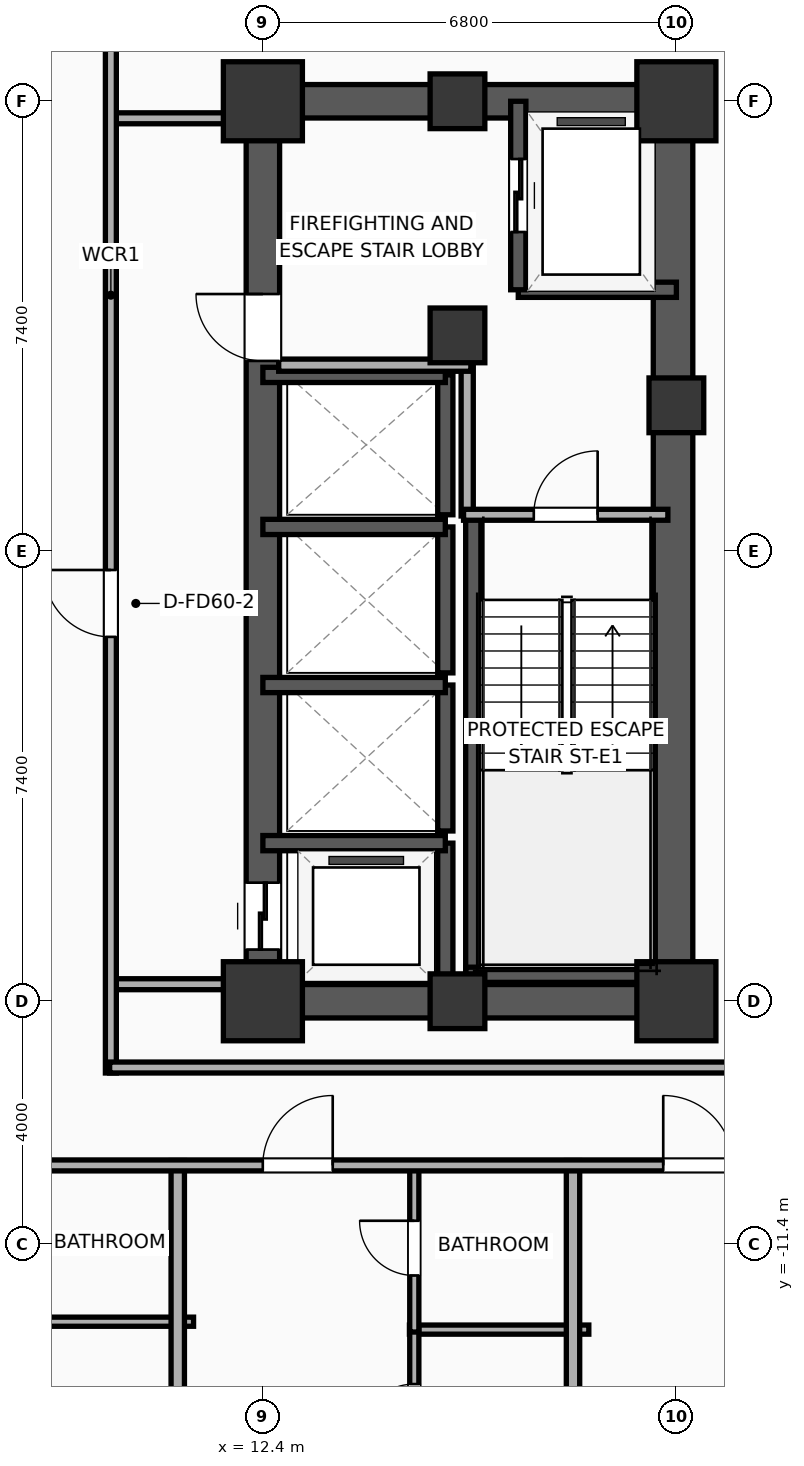
"""IFC4 building model, lengths in metres.
Left out: names, types, materials, properties, quantities, classifications, styles, units other than length and angle.
Written with IfcOpenShell. Run it as: python <this file> out.ifc"""

import sys

from ifc_helpers import new_model, si_unit, direction, frame, frame_2d, origin, origin_2d, place, context, subcontext, project, spatial, rectangle, extrude, element, fill, save


model = new_model("IFC4")
c1 = context("Model", 3, precision=1e-05, world=origin(), true_north=direction((0.0, 1.0)))
c2 = subcontext(c1, "Body", "Model", "MODEL_VIEW")
j1 = project(units=[si_unit("LENGTHUNIT", "METRE"), si_unit("PLANEANGLEUNIT", "RADIAN")], contexts=[c1])
p1 = place(None, origin())
s1 = spatial("IfcSite", under=j1, at=p1, CompositionType="ELEMENT")
p2 = place(p1, origin())
s2 = spatial("IfcBuilding", under=s1, at=p2, CompositionType="ELEMENT")
p3 = place(p2, frame((0.0, 0.0, 128.7)))
s3 = spatial("IfcBuildingStorey", under=s2, at=p3, CompositionType="ELEMENT", Elevation=128.7)
p4 = place(p3, frame((12.4, -7.4, 0.0), z_axis=(0.0, 0.0, 1.0), x_axis=(1.0, 0.0, 0.0)))
e1 = element("IfcColumn", 1, at=p4, inside=s3, PredefinedType="COLUMN", context=c2, shape_type="SweptSolid", body=[
    extrude(rectangle(XDim=1.3, YDim=1.3, at=origin_2d()), origin(), (0.0, 0.0, 1.0), 3.9),
])
p5 = place(p3, frame((15.6, 3.55, 0.0), z_axis=(0.0, 0.0, 1.0), x_axis=(1.0, 0.0, 0.0)))
e2 = element("IfcColumn", 2, at=p5, inside=s3, PredefinedType="COLUMN", context=c2, shape_type="SweptSolid", body=[
    extrude(rectangle(XDim=0.9, YDim=0.9, at=origin_2d()), origin(), (0.0, 0.0, 1.0), 3.9),
])
p6 = place(p3, frame((12.4, 7.4, 0.0), z_axis=(0.0, 0.0, 1.0), x_axis=(1.0, 0.0, 0.0)))
e3 = element("IfcColumn", 3, at=p6, inside=s3, PredefinedType="COLUMN", context=c2, shape_type="SweptSolid", body=[
    extrude(rectangle(XDim=1.3, YDim=1.3, at=origin_2d()), origin(), (0.0, 0.0, 1.0), 3.9),
])
for number, where, z_axis, x_axis in (
    (4, (15.6, -7.4, 0.0), (0.0, 0.0, 1.0), (1.0, 0.0, 0.0)),
    (5, (15.6, 7.4, 0.0), (0.0, 0.0, 1.0), (1.0, 0.0, 0.0)),
):
    element("IfcColumn", number, at=place(p3, frame(where, z_axis=z_axis, x_axis=x_axis)), inside=s3, PredefinedType="COLUMN", context=c2, shape_type="SweptSolid", body=[
        extrude(rectangle(XDim=0.9, YDim=0.9, at=origin_2d()), origin(), (0.0, 0.0, 1.0), 3.9),
    ])
p7 = place(p3, frame((19.2, -7.4, 0.0), z_axis=(0.0, 0.0, 1.0), x_axis=(1.0, 0.0, 0.0)))
e6 = element("IfcColumn", 6, at=p7, inside=s3, PredefinedType="COLUMN", context=c2, shape_type="SweptSolid", body=[
    extrude(rectangle(XDim=1.3, YDim=1.3, at=origin_2d()), origin(), (0.0, 0.0, 1.0), 3.9),
])
p8 = place(p3, frame((19.2, 2.4, 0.0), z_axis=(0.0, 0.0, 1.0), x_axis=(1.0, 0.0, 0.0)))
e7 = element("IfcColumn", 7, at=p8, inside=s3, PredefinedType="COLUMN", context=c2, shape_type="SweptSolid", body=[
    extrude(rectangle(XDim=0.9, YDim=0.9, at=origin_2d()), origin(), (0.0, 0.0, 1.0), 3.9),
])
p9 = place(p3, frame((19.2, 7.4, 0.0), z_axis=(0.0, 0.0, 1.0), x_axis=(1.0, 0.0, 0.0)))
e8 = element("IfcColumn", 8, at=p9, inside=s3, PredefinedType="COLUMN", context=c2, shape_type="SweptSolid", body=[
    extrude(rectangle(XDim=1.3, YDim=1.3, at=origin_2d()), origin(), (0.0, 0.0, 1.0), 3.9),
])
for number, where, z_axis, x_axis in (
    (9, (12.125, -7.4, 0.0), (0.0, 0.0, 1.0), (1.0, 0.0, 0.0)),
    (10, (12.125, 7.4, 0.0), (0.0, 0.0, 1.0), (1.0, 0.0, 0.0)),
):
    element("IfcWall", number, at=place(p3, frame(where, z_axis=z_axis, x_axis=x_axis)), inside=s3, PredefinedType="SHEAR", context=c2, shape_type="SweptSolid", body=[
        extrude(rectangle(XDim=7.35, YDim=0.55, at=frame_2d((3.675, 0.0))), origin(), (0.0, 0.0, 1.0), 3.65),
    ])
p10 = place(p3, frame((12.4, -7.4, 0.0), z_axis=(0.0, 0.0, 1.0), x_axis=(0.0, 1.0, 0.0)))
e11 = element("IfcWall", 11, at=p10, inside=s3, PredefinedType="SHEAR", context=c2, shape_type="SweptSolid", body=[
    extrude(rectangle(XDim=14.8, YDim=0.55, at=frame_2d((7.4, 0.0))), origin(), (0.0, 0.0, 1.0), 3.65),
])
p11 = place(p10, frame((0.85, 0.0, 0.0)))
e12 = element("IfcOpeningElement", 12, at=p11, cuts=e11, PredefinedType="OPENING", context=c2, shape_type="SweptSolid", body=[
    extrude(rectangle(XDim=1.1, YDim=2.05, at=frame_2d((0.55, 1.025))), frame((0.0, 0.285, 0.0), z_axis=(0.0, -1.0, 0.0), x_axis=(1.0, 0.0, 0.0)), (0.0, 0.0, 1.0), 0.57),
])
p12 = place(p10, frame((10.53, 0.0, 0.0)))
e13 = element("IfcOpeningElement", 13, at=p12, cuts=e11, PredefinedType="OPENING", context=c2, shape_type="SweptSolid", body=[
    extrude(rectangle(XDim=1.1, YDim=2.05, at=frame_2d((0.55, 1.025))), frame((0.0, 0.285, 0.0), z_axis=(0.0, -1.0, 0.0), x_axis=(1.0, 0.0, 0.0)), (0.0, 0.0, 1.0), 0.57),
])
p13 = place(p3, frame((19.145, -7.4, 0.0), z_axis=(0.0, 0.0, 1.0), x_axis=(0.0, 1.0, 0.0)))
e14 = element("IfcWall", 14, at=p13, inside=s3, PredefinedType="SHEAR", context=c2, shape_type="SweptSolid", body=[
    extrude(rectangle(XDim=14.8, YDim=0.65, at=frame_2d((7.4, 0.0))), origin(), (0.0, 0.0, 1.0), 3.65),
])
p14 = place(p3, frame((15.86, -7.085, 0.0), z_axis=(0.0, 0.0, 1.0), x_axis=(0.0, 1.0, 0.0)))
e15 = element("IfcWall", 15, at=p14, inside=s3, PredefinedType="SOLIDWALL", context=c2, shape_type="SweptSolid", body=[
    extrude(rectangle(XDim=7.685, YDim=0.25, at=frame_2d((3.843, 0.0))), origin(), (0.0, 0.0, 1.0), 3.65),
])
p15 = place(p3, frame((15.74, -6.965, 0.0), z_axis=(0.0, 0.0, 1.0), x_axis=(1.0, 0.0, 0.0)))
e16 = element("IfcWall", 16, at=p15, inside=s3, PredefinedType="SOLIDWALL", context=c2, shape_type="SweptSolid", body=[
    extrude(rectangle(XDim=3.46, YDim=0.25, at=frame_2d((1.73, 0.0))), origin(), (0.0, 0.0, 1.0), 3.65),
])
p16 = place(p3, frame((16.6, 4.3, 0.0), z_axis=(0.0, 0.0, 1.0), x_axis=(1.0, 0.0, 0.0)))
e17 = element("IfcWall", 17, at=p16, inside=s3, PredefinedType="SOLIDWALL", context=c2, shape_type="SweptSolid", body=[
    extrude(rectangle(XDim=2.6, YDim=0.25, at=frame_2d((1.3, 0.0))), origin(), (0.0, 0.0, 1.0), 3.65),
])
p17 = place(p3, frame((16.6, 7.4, 0.0), z_axis=(0.0, 0.0, 1.0), x_axis=(0.0, -1.0, 0.0)))
e18 = element("IfcWall", 18, at=p17, inside=s3, PredefinedType="SOLIDWALL", context=c2, shape_type="SweptSolid", body=[
    extrude(rectangle(XDim=3.1, YDim=0.25, at=frame_2d((1.55, 0.0))), origin(), (0.0, 0.0, 1.0), 3.65),
])
p18 = place(p17, frame((0.95, 0.0, 0.0)))
e19 = element("IfcOpeningElement", 19, at=p18, cuts=e18, PredefinedType="OPENING", context=c2, shape_type="SweptSolid", body=[
    extrude(rectangle(XDim=1.2, YDim=2.05, at=frame_2d((0.6, 1.025))), frame((0.0, 0.135, 0.0), z_axis=(0.0, -1.0, 0.0), x_axis=(1.0, 0.0, 0.0)), (0.0, 0.0, 1.0), 0.27),
])
p19 = place(p3, frame((15.4, -7.4, 0.0), z_axis=(0.0, 0.0, 1.0), x_axis=(0.0, 1.0, 0.0)))
e20 = element("IfcWall", 20, at=p19, inside=s3, PredefinedType="SOLIDWALL", context=c2, shape_type="SweptSolid", body=[
    extrude(rectangle(XDim=2.6, YDim=0.25, at=frame_2d((1.3, 0.0))), origin(), (0.0, 0.0, 1.0), 3.65),
])
p20 = place(p3, frame((15.4, -4.8, 0.0), z_axis=(0.0, 0.0, 1.0), x_axis=(-1.0, 0.0, 0.0)))
e21 = element("IfcWall", 21, at=p20, inside=s3, PredefinedType="SOLIDWALL", context=c2, shape_type="SweptSolid", body=[
    extrude(rectangle(XDim=3.0, YDim=0.25, at=frame_2d((1.5, 0.0))), origin(), (0.0, 0.0, 1.0), 3.65),
])
p21 = place(p3, frame((15.4, -4.6, 0.0), z_axis=(0.0, 0.0, 1.0), x_axis=(0.0, 1.0, 0.0)))
e22 = element("IfcWall", 22, at=p21, inside=s3, PredefinedType="SOLIDWALL", context=c2, shape_type="SweptSolid", body=[
    extrude(rectangle(XDim=2.4, YDim=0.25, at=frame_2d((1.2, 0.0))), origin(), (0.0, 0.0, 1.0), 3.65),
])
p22 = place(p3, frame((15.4, -2.2, 0.0), z_axis=(0.0, 0.0, 1.0), x_axis=(-1.0, 0.0, 0.0)))
e23 = element("IfcWall", 23, at=p22, inside=s3, PredefinedType="SOLIDWALL", context=c2, shape_type="SweptSolid", body=[
    extrude(rectangle(XDim=3.0, YDim=0.25, at=frame_2d((1.5, 0.0))), origin(), (0.0, 0.0, 1.0), 3.65),
])
p23 = place(p3, frame((15.4, -2.0, 0.0), z_axis=(0.0, 0.0, 1.0), x_axis=(0.0, 1.0, 0.0)))
e24 = element("IfcWall", 24, at=p23, inside=s3, PredefinedType="SOLIDWALL", context=c2, shape_type="SweptSolid", body=[
    extrude(rectangle(XDim=2.4, YDim=0.25, at=frame_2d((1.2, 0.0))), origin(), (0.0, 0.0, 1.0), 3.65),
])
p24 = place(p3, frame((15.4, 0.4, 0.0), z_axis=(0.0, 0.0, 1.0), x_axis=(-1.0, 0.0, 0.0)))
e25 = element("IfcWall", 25, at=p24, inside=s3, PredefinedType="SOLIDWALL", context=c2, shape_type="SweptSolid", body=[
    extrude(rectangle(XDim=3.0, YDim=0.25, at=frame_2d((1.5, 0.0))), origin(), (0.0, 0.0, 1.0), 3.65),
])
p25 = place(p3, frame((15.4, 0.6, 0.0), z_axis=(0.0, 0.0, 1.0), x_axis=(0.0, 1.0, 0.0)))
e26 = element("IfcWall", 26, at=p25, inside=s3, PredefinedType="SOLIDWALL", context=c2, shape_type="SweptSolid", body=[
    extrude(rectangle(XDim=2.3, YDim=0.25, at=frame_2d((1.15, 0.0))), origin(), (0.0, 0.0, 1.0), 3.65),
])
p26 = place(p3, frame((15.4, 2.9, 0.0), z_axis=(0.0, 0.0, 1.0), x_axis=(-1.0, 0.0, 0.0)))
e27 = element("IfcWall", 27, at=p26, inside=s3, PredefinedType="SOLIDWALL", context=c2, shape_type="SweptSolid", body=[
    extrude(rectangle(XDim=3.0, YDim=0.25, at=frame_2d((1.5, 0.0))), origin(), (0.0, 0.0, 1.0), 3.65),
])
p27 = place(p3, frame((15.76, 0.58, 0.0), z_axis=(0.0, 0.0, 1.0), x_axis=(0.0, 1.0, 0.0)))
e28 = element("IfcWall", 28, at=p27, inside=s3, PredefinedType="PARTITIONING", context=c2, shape_type="SweptSolid", body=[
    extrude(rectangle(XDim=2.52, YDim=0.2, at=frame_2d((1.26, 0.0))), origin(), (0.0, 0.0, 1.0), 3.65),
])
p28 = place(p3, frame((12.66, 3.06, 0.0), z_axis=(0.0, 0.0, 1.0), x_axis=(1.0, 0.0, 0.0)))
e29 = element("IfcWall", 29, at=p28, inside=s3, PredefinedType="PARTITIONING", context=c2, shape_type="SweptSolid", body=[
    extrude(rectangle(XDim=3.16, YDim=0.2, at=frame_2d((1.58, 0.0))), origin(), (0.0, 0.0, 1.0), 3.65),
])
p29 = place(p3, frame((15.7, 0.6, 0.0), z_axis=(0.0, 0.0, 1.0), x_axis=(1.0, 0.0, 0.0)))
e30 = element("IfcWall", 30, at=p29, inside=s3, PredefinedType="PARTITIONING", context=c2, shape_type="SweptSolid", body=[
    extrude(rectangle(XDim=3.36, YDim=0.18, at=frame_2d((1.68, 0.0))), origin(), (0.0, 0.0, 1.0), 3.65),
])
p30 = place(p29, frame((1.155, 0.0, 0.0)))
e31 = element("IfcOpeningElement", 31, at=p30, cuts=e30, PredefinedType="OPENING", context=c2, shape_type="SweptSolid", body=[
    extrude(rectangle(XDim=1.05, YDim=2.05, at=frame_2d((0.525, 1.025))), frame((0.0, 0.1, 0.0), z_axis=(0.0, -1.0, 0.0), x_axis=(1.0, 0.0, 0.0)), (0.0, 0.0, 1.0), 0.2),
])
for number, where, z_axis, x_axis in (
    (32, (9.88, 7.12, 0.0), (0.0, 0.0, 1.0), (1.0, 0.0, 0.0)),
    (33, (9.88, -7.12, 0.0), (0.0, 0.0, 1.0), (1.0, 0.0, 0.0)),
):
    element("IfcWall", number, at=place(p3, frame(where, z_axis=z_axis, x_axis=x_axis)), inside=s3, PredefinedType="PARTITIONING", context=c2, shape_type="SweptSolid", body=[
        extrude(rectangle(XDim=2.27, YDim=0.18, at=frame_2d((1.135, 0.0))), origin(), (0.0, 0.0, 1.0), 3.65),
    ])
p31 = place(p3, frame((9.9, -8.58, 0.0), z_axis=(0.0, 0.0, 1.0), x_axis=(0.0, 1.0, 0.0)))
e34 = element("IfcWall", 34, at=p31, inside=s3, PredefinedType="PARTITIONING", context=c2, shape_type="SweptSolid", body=[
    extrude(rectangle(XDim=17.16, YDim=0.18, at=frame_2d((8.58, 0.0))), origin(), (0.0, 0.0, 1.0), 3.65),
])
p32 = place(p31, frame((7.172, 0.0, 0.0)))
e35 = element("IfcOpeningElement", 35, at=p32, cuts=e34, PredefinedType="OPENING", context=c2, shape_type="SweptSolid", body=[
    extrude(rectangle(XDim=1.1, YDim=2.05, at=frame_2d((0.55, 1.025))), frame((0.0, 0.1, 0.0), z_axis=(0.0, -1.0, 0.0), x_axis=(1.0, 0.0, 0.0)), (0.0, 0.0, 1.0), 0.2),
])
p33 = place(p3, frame((9.88, -8.49, 0.0), z_axis=(0.0, 0.0, 1.0), x_axis=(1.0, 0.0, 0.0)))
e36 = element("IfcWall", 36, at=p33, inside=s3, PredefinedType="PARTITIONING", context=c2, shape_type="SweptSolid", body=[
    extrude(rectangle(XDim=23.33, YDim=0.18, at=frame_2d((11.665, 0.0))), origin(), (0.0, 0.0, 1.0), 3.65),
])
p34 = place(p3, frame((8.711, -12.67, 0.0), z_axis=(0.0, 0.0, 1.0), x_axis=(1.0, 0.0, 0.0)))
e37 = element("IfcWall", 37, at=p34, inside=s3, PredefinedType="PLUMBINGWALL", context=c2, shape_type="SweptSolid", body=[
    extrude(rectangle(XDim=2.549, YDim=0.15, at=frame_2d((1.274, 0.0))), origin(), (0.0, 0.0, 1.0), 3.65),
])
p35 = place(p3, frame((11.0, -20.41, 0.0), z_axis=(0.0, 0.0, 1.0), x_axis=(0.0, 1.0, 0.0)))
e38 = element("IfcWall", 38, at=p35, inside=s3, PredefinedType="PARTITIONING", context=c2, shape_type="SweptSolid", body=[
    extrude(rectangle(XDim=10.39, YDim=0.22, at=frame_2d((5.195, 0.0))), origin(), (0.0, 0.0, 1.0), 3.65),
])
p36 = place(p3, frame((14.81, -12.8, 0.0), z_axis=(0.0, 0.0, 1.0), x_axis=(1.0, 0.0, 0.0)))
e39 = element("IfcWall", 39, at=p36, inside=s3, PredefinedType="PLUMBINGWALL", context=c2, shape_type="SweptSolid", body=[
    extrude(rectangle(XDim=2.95, YDim=0.15, at=frame_2d((1.475, 0.0))), origin(), (0.0, 0.0, 1.0), 3.65),
])
p37 = place(p3, frame((14.89, -20.458, 0.0), z_axis=(0.0, 0.0, 1.0), x_axis=(0.0, 1.0, 0.0)))
e40 = element("IfcWall", 40, at=p37, inside=s3, PredefinedType="PLUMBINGWALL", context=c2, shape_type="SweptSolid", body=[
    extrude(rectangle(XDim=7.698, YDim=0.15, at=frame_2d((3.849, 0.0))), origin(), (0.0, 0.0, 1.0), 3.65),
])
p38 = place(p37, frame((5.862, 0.0, 0.0)))
e41 = element("IfcOpeningElement", 41, at=p38, cuts=e40, PredefinedType="OPENING", context=c2, shape_type="SweptSolid", body=[
    extrude(rectangle(XDim=0.9, YDim=2.05, at=frame_2d((0.45, 1.025))), frame((0.0, 0.085, 0.0), z_axis=(0.0, -1.0, 0.0), x_axis=(1.0, 0.0, 0.0)), (0.0, 0.0, 1.0), 0.17),
])
p39 = place(p3, frame((14.89, -12.84, 0.0), z_axis=(0.0, 0.0, 1.0), x_axis=(0.0, 1.0, 0.0)))
e42 = element("IfcWall", 42, at=p39, inside=s3, PredefinedType="PLUMBINGWALL", context=c2, shape_type="SweptSolid", body=[
    extrude(rectangle(XDim=2.76, YDim=0.15, at=frame_2d((1.38, 0.0))), origin(), (0.0, 0.0, 1.0), 3.65),
])
p40 = place(p39, frame((0.93, 0.0, 0.0)))
e43 = element("IfcOpeningElement", 43, at=p40, cuts=e42, PredefinedType="OPENING", context=c2, shape_type="SweptSolid", body=[
    extrude(rectangle(XDim=0.9, YDim=2.05, at=frame_2d((0.45, 1.025))), frame((0.0, 0.085, 0.0), z_axis=(0.0, -1.0, 0.0), x_axis=(1.0, 0.0, 0.0)), (0.0, 0.0, 1.0), 0.17),
])
p41 = place(p3, frame((17.5, -20.41, 0.0), z_axis=(0.0, 0.0, 1.0), x_axis=(0.0, 1.0, 0.0)))
e44 = element("IfcWall", 44, at=p41, inside=s3, PredefinedType="PARTITIONING", context=c2, shape_type="SweptSolid", body=[
    extrude(rectangle(XDim=10.39, YDim=0.22, at=frame_2d((5.195, 0.0))), origin(), (0.0, 0.0, 1.0), 3.65),
])
p42 = place(p3, frame((-29.21, -10.1, 0.0), z_axis=(0.0, 0.0, 1.0), x_axis=(1.0, 0.0, 0.0)))
e45 = element("IfcWall", 45, at=p42, inside=s3, PredefinedType="PARTITIONING", context=c2, shape_type="SweptSolid", body=[
    extrude(rectangle(XDim=62.42, YDim=0.18, at=frame_2d((31.21, 0.0))), origin(), (0.0, 0.0, 1.0), 3.65),
])
p43 = place(p42, frame((3.414, 0.0, 0.0)))
e46 = element("IfcOpeningElement", 46, at=p43, cuts=e45, PredefinedType="OPENING", context=c2, shape_type="SweptSolid", body=[
    extrude(rectangle(XDim=1.15, YDim=2.05, at=frame_2d((0.575, 1.025))), frame((0.0, 0.1, 0.0), z_axis=(0.0, -1.0, 0.0), x_axis=(1.0, 0.0, 0.0)), (0.0, 0.0, 1.0), 0.2),
])
p44 = place(p42, frame((11.659, 0.0, 0.0)))
e47 = element("IfcOpeningElement", 47, at=p44, cuts=e45, PredefinedType="OPENING", context=c2, shape_type="SweptSolid", body=[
    extrude(rectangle(XDim=1.15, YDim=2.05, at=frame_2d((0.575, 1.025))), frame((0.0, 0.1, 0.0), z_axis=(0.0, -1.0, 0.0), x_axis=(1.0, 0.0, 0.0)), (0.0, 0.0, 1.0), 0.2),
])
p45 = place(p42, frame((17.14, 0.0, 0.0)))
e48 = element("IfcOpeningElement", 48, at=p45, cuts=e45, PredefinedType="OPENING", context=c2, shape_type="SweptSolid", body=[
    extrude(rectangle(XDim=0.9, YDim=2.05, at=frame_2d((0.45, 1.025))), frame((0.0, 0.1, 0.0), z_axis=(0.0, -1.0, 0.0), x_axis=(1.0, 0.0, 0.0)), (0.0, 0.0, 1.0), 0.2),
])
p46 = place(p42, frame((24.661, 0.0, 0.0)))
e49 = element("IfcOpeningElement", 49, at=p46, cuts=e45, PredefinedType="OPENING", context=c2, shape_type="SweptSolid", body=[
    extrude(rectangle(XDim=1.15, YDim=2.05, at=frame_2d((0.575, 1.025))), frame((0.0, 0.1, 0.0), z_axis=(0.0, -1.0, 0.0), x_axis=(1.0, 0.0, 0.0)), (0.0, 0.0, 1.0), 0.2),
])
p47 = place(p42, frame((28.644, 0.0, 0.0)))
e50 = element("IfcOpeningElement", 50, at=p47, cuts=e45, PredefinedType="OPENING", context=c2, shape_type="SweptSolid", body=[
    extrude(rectangle(XDim=1.15, YDim=2.05, at=frame_2d((0.575, 1.025))), frame((0.0, 0.1, 0.0), z_axis=(0.0, -1.0, 0.0), x_axis=(1.0, 0.0, 0.0)), (0.0, 0.0, 1.0), 0.2),
])
p48 = place(p42, frame((36.64, 0.0, 0.0)))
e51 = element("IfcOpeningElement", 51, at=p48, cuts=e45, PredefinedType="OPENING", context=c2, shape_type="SweptSolid", body=[
    extrude(rectangle(XDim=0.9, YDim=2.05, at=frame_2d((0.45, 1.025))), frame((0.0, 0.1, 0.0), z_axis=(0.0, -1.0, 0.0), x_axis=(1.0, 0.0, 0.0)), (0.0, 0.0, 1.0), 0.2),
])
p49 = place(p42, frame((41.608, 0.0, 0.0)))
e52 = element("IfcOpeningElement", 52, at=p49, cuts=e45, PredefinedType="OPENING", context=c2, shape_type="SweptSolid", body=[
    extrude(rectangle(XDim=1.15, YDim=2.05, at=frame_2d((0.575, 1.025))), frame((0.0, 0.1, 0.0), z_axis=(0.0, -1.0, 0.0), x_axis=(1.0, 0.0, 0.0)), (0.0, 0.0, 1.0), 0.2),
])
p50 = place(p42, frame((48.194, 0.0, 0.0)))
e53 = element("IfcOpeningElement", 53, at=p50, cuts=e45, PredefinedType="OPENING", context=c2, shape_type="SweptSolid", body=[
    extrude(rectangle(XDim=1.15, YDim=2.05, at=frame_2d((0.575, 1.025))), frame((0.0, 0.1, 0.0), z_axis=(0.0, -1.0, 0.0), x_axis=(1.0, 0.0, 0.0)), (0.0, 0.0, 1.0), 0.2),
])
p51 = place(p42, frame((57.525, 0.0, 0.0)))
e54 = element("IfcOpeningElement", 54, at=p51, cuts=e45, PredefinedType="OPENING", context=c2, shape_type="SweptSolid", body=[
    extrude(rectangle(XDim=1.15, YDim=2.05, at=frame_2d((0.575, 1.025))), frame((0.0, 0.1, 0.0), z_axis=(0.0, -1.0, 0.0), x_axis=(1.0, 0.0, 0.0)), (0.0, 0.0, 1.0), 0.2),
])
p52 = place(p18, origin())
e55 = element("IfcDoor", 55, at=p52, inside=s3, OperationType="SLIDING_TO_LEFT", PredefinedType="DOOR", context=c2, shape_type="SweptSolid", body=[
    extrude(rectangle(XDim=1.2, YDim=2.05, at=frame_2d((0.6, 1.025))), frame((0.0, 0.025, 0.0), z_axis=(0.0, -1.0, 0.0), x_axis=(1.0, 0.0, 0.0)), (0.0, 0.0, 1.0), 0.05),
])
fill(e19, e55)
p53 = place(p11, origin())
e56 = element("IfcDoor", 56, at=p53, inside=s3, OperationType="SLIDING_TO_LEFT", PredefinedType="DOOR", context=c2, shape_type="SweptSolid", body=[
    extrude(rectangle(XDim=1.1, YDim=2.05, at=frame_2d((0.55, 1.025))), frame((0.0, 0.025, 0.0), z_axis=(0.0, -1.0, 0.0), x_axis=(1.0, 0.0, 0.0)), (0.0, 0.0, 1.0), 0.05),
])
fill(e12, e56)
p54 = place(p30, origin())
e57 = element("IfcDoor", 57, at=p54, inside=s3, OperationType="SINGLE_SWING_RIGHT", PredefinedType="DOOR", context=c2, shape_type="SweptSolid", body=[
    extrude(rectangle(XDim=1.05, YDim=2.05, at=frame_2d((0.525, 1.025))), frame((0.0, 0.025, 0.0), z_axis=(0.0, -1.0, 0.0), x_axis=(1.0, 0.0, 0.0)), (0.0, 0.0, 1.0), 0.05),
])
fill(e31, e57)
p55 = place(p32, origin())
e58 = element("IfcDoor", 58, at=p55, inside=s3, OperationType="SINGLE_SWING_RIGHT", PredefinedType="DOOR", context=c2, shape_type="SweptSolid", body=[
    extrude(rectangle(XDim=1.1, YDim=2.05, at=frame_2d((0.55, 1.025))), frame((0.0, 0.025, 0.0), z_axis=(0.0, -1.0, 0.0), x_axis=(1.0, 0.0, 0.0)), (0.0, 0.0, 1.0), 0.05),
])
fill(e35, e58)
p56 = place(p38, origin())
e59 = element("IfcDoor", 59, at=p56, inside=s3, OperationType="SINGLE_SWING_LEFT", PredefinedType="DOOR", context=c2, shape_type="SweptSolid", body=[
    extrude(rectangle(XDim=0.9, YDim=2.05, at=frame_2d((0.45, 1.025))), frame((0.0, 0.025, 0.0), z_axis=(0.0, -1.0, 0.0), x_axis=(1.0, 0.0, 0.0)), (0.0, 0.0, 1.0), 0.05),
])
fill(e41, e59)
p57 = place(p40, origin())
e60 = element("IfcDoor", 60, at=p57, inside=s3, OperationType="SINGLE_SWING_RIGHT", PredefinedType="DOOR", context=c2, shape_type="SweptSolid", body=[
    extrude(rectangle(XDim=0.9, YDim=2.05, at=frame_2d((0.45, 1.025))), frame((0.0, 0.025, 0.0), z_axis=(0.0, -1.0, 0.0), x_axis=(1.0, 0.0, 0.0)), (0.0, 0.0, 1.0), 0.05),
])
fill(e43, e60)
p58 = place(p49, origin())
e61 = element("IfcDoor", 61, at=p58, inside=s3, OperationType="SINGLE_SWING_RIGHT", PredefinedType="DOOR", context=c2, shape_type="SweptSolid", body=[
    extrude(rectangle(XDim=1.15, YDim=2.05, at=frame_2d((0.575, 1.025))), frame((0.0, 0.025, 0.0), z_axis=(0.0, -1.0, 0.0), x_axis=(1.0, 0.0, 0.0)), (0.0, 0.0, 1.0), 0.05),
])
fill(e52, e61)
p59 = place(p50, origin())
e62 = element("IfcDoor", 62, at=p59, inside=s3, OperationType="SINGLE_SWING_LEFT", PredefinedType="DOOR", context=c2, shape_type="SweptSolid", body=[
    extrude(rectangle(XDim=1.15, YDim=2.05, at=frame_2d((0.575, 1.025))), frame((0.0, 0.025, 0.0), z_axis=(0.0, -1.0, 0.0), x_axis=(1.0, 0.0, 0.0)), (0.0, 0.0, 1.0), 0.05),
])
fill(e53, e62)
p60 = place(p12, origin())
e63 = element("IfcDoor", 63, at=p60, inside=s3, OperationType="SINGLE_SWING_RIGHT", PredefinedType="DOOR", context=c2, shape_type="SweptSolid", body=[
    extrude(rectangle(XDim=1.1, YDim=2.05, at=frame_2d((0.55, 1.025))), frame((0.0, 0.025, 0.0), z_axis=(0.0, -1.0, 0.0), x_axis=(1.0, 0.0, 0.0)), (0.0, 0.0, 1.0), 0.05),
])
fill(e13, e63)
save(model, sys.argv[1])
